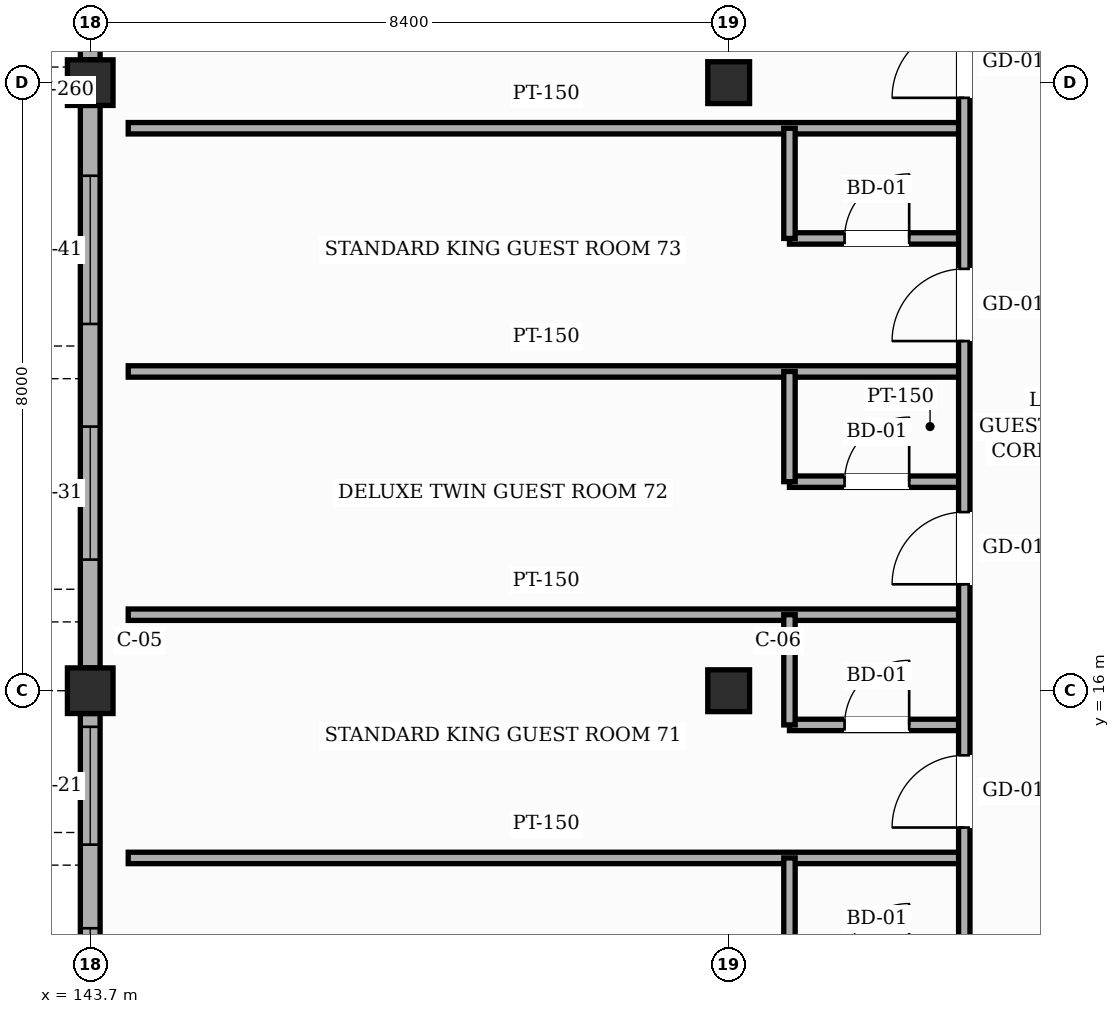
"""IFC4 building model, lengths in metres.
Left out: names, types, materials, properties, quantities, classifications, styles, units other than length and angle.
Written with IfcOpenShell. Run it as: python <this file> out.ifc"""

import sys

from ifc_helpers import new_model, si_unit, direction, frame, frame_2d, origin, origin_2d, place, context, subcontext, project, spatial, rectangle, hollow_rectangle, extrude, element, fill, save


model = new_model("IFC4")
c1 = context("Model", 3, precision=1e-05, world=origin(), true_north=direction((0.0, 1.0)))
c2 = subcontext(c1, "Body", "Model", "MODEL_VIEW")
j1 = project(units=[si_unit("LENGTHUNIT", "METRE"), si_unit("PLANEANGLEUNIT", "RADIAN")], contexts=[c1])
p1 = place(None, origin())
s1 = spatial("IfcSite", under=j1, at=p1, CompositionType="ELEMENT")
p2 = place(p1, origin())
s2 = spatial("IfcBuilding", under=s1, at=p2, CompositionType="ELEMENT")
p3 = place(p2, frame((0.0, 0.0, 24.6)))
s3 = spatial("IfcBuildingStorey", under=s2, at=p3, CompositionType="ELEMENT", Elevation=24.6)
for number, where, z_axis, x_axis in (
    (1, (143.7, 16.0, 0.0), (0.0, 0.0, 1.0), (1.0, 0.0, 0.0)),
    (2, (143.7, 24.0, 0.0), (0.0, 0.0, 1.0), (1.0, 0.0, 0.0)),
):
    element("IfcColumn", number, at=place(p3, frame(where, z_axis=z_axis, x_axis=x_axis)), inside=s3, PredefinedType="COLUMN", context=c2, shape_type="SweptSolid", body=[
        extrude(hollow_rectangle(XDim=0.6, YDim=0.6, WallThickness=0.025, InnerFilletRadius=0.025, OuterFilletRadius=0.05, at=origin_2d()), origin(), (0.0, 0.0, 1.0), 3.6),
    ])
for number, where, z_axis, x_axis in (
    (3, (152.1, 16.0, 0.0), (0.0, 0.0, 1.0), (1.0, 0.0, 0.0)),
    (4, (152.1, 24.0, 0.0), (0.0, 0.0, 1.0), (1.0, 0.0, 0.0)),
):
    element("IfcColumn", number, at=place(p3, frame(where, z_axis=z_axis, x_axis=x_axis)), inside=s3, PredefinedType="COLUMN", context=c2, shape_type="SweptSolid", body=[
        extrude(hollow_rectangle(XDim=0.55, YDim=0.55, WallThickness=0.022, InnerFilletRadius=0.022, OuterFilletRadius=0.044, at=origin_2d()), origin(), (0.0, 0.0, 1.0), 3.6),
    ])
p4 = place(p3, frame((143.7, 8.3, 0.0), z_axis=(0.0, 0.0, 1.0), x_axis=(0.0, 1.0, 0.0)))
e5 = element("IfcWall", 5, at=p4, inside=s3, PredefinedType="SOLIDWALL", context=c2, shape_type="SweptSolid", body=[
    extrude(rectangle(XDim=7.4, YDim=0.26, at=frame_2d((3.7, 0.0))), origin(), (0.0, 0.0, 1.0), 2.805),
])
p5 = place(p4, frame((0.725, 0.0, 0.85)))
e6 = element("IfcOpeningElement", 6, at=p5, cuts=e5, PredefinedType="OPENING", context=c2, shape_type="SweptSolid", body=[
    extrude(rectangle(XDim=0.85, YDim=1.35, at=frame_2d((0.425, 0.675))), frame((0.0, 0.14, 0.0), z_axis=(0.0, -1.0, 0.0), x_axis=(1.0, 0.0, 0.0)), (0.0, 0.0, 1.0), 0.28),
])
p6 = place(p4, frame((3.225, 0.0, 0.85)))
e7 = element("IfcOpeningElement", 7, at=p6, cuts=e5, PredefinedType="OPENING", context=c2, shape_type="SweptSolid", body=[
    extrude(rectangle(XDim=1.35, YDim=1.35, at=frame_2d((0.675, 0.675))), frame((0.0, 0.14, 0.0), z_axis=(0.0, -1.0, 0.0), x_axis=(1.0, 0.0, 0.0)), (0.0, 0.0, 1.0), 0.28),
])
p7 = place(p4, frame((5.675, 0.0, 0.85)))
e8 = element("IfcOpeningElement", 8, at=p7, cuts=e5, PredefinedType="OPENING", context=c2, shape_type="SweptSolid", body=[
    extrude(rectangle(XDim=1.55, YDim=1.35, at=frame_2d((0.775, 0.675))), frame((0.0, 0.14, 0.0), z_axis=(0.0, -1.0, 0.0), x_axis=(1.0, 0.0, 0.0)), (0.0, 0.0, 1.0), 0.28),
])
p8 = place(p3, frame((143.7, 16.3, 0.0), z_axis=(0.0, 0.0, 1.0), x_axis=(0.0, 1.0, 0.0)))
e9 = element("IfcWall", 9, at=p8, inside=s3, PredefinedType="SOLIDWALL", context=c2, shape_type="SweptSolid", body=[
    extrude(rectangle(XDim=7.4, YDim=0.26, at=frame_2d((3.7, 0.0))), origin(), (0.0, 0.0, 1.0), 2.805),
])
p9 = place(p8, frame((1.425, 0.0, 0.85)))
e10 = element("IfcOpeningElement", 10, at=p9, cuts=e9, PredefinedType="OPENING", context=c2, shape_type="SweptSolid", body=[
    extrude(rectangle(XDim=1.75, YDim=1.35, at=frame_2d((0.875, 0.675))), frame((0.0, 0.14, 0.0), z_axis=(0.0, -1.0, 0.0), x_axis=(1.0, 0.0, 0.0)), (0.0, 0.0, 1.0), 0.28),
])
p10 = place(p8, frame((4.525, 0.0, 0.85)))
e11 = element("IfcOpeningElement", 11, at=p10, cuts=e9, PredefinedType="OPENING", context=c2, shape_type="SweptSolid", body=[
    extrude(rectangle(XDim=1.95, YDim=1.35, at=frame_2d((0.975, 0.675))), frame((0.0, 0.14, 0.0), z_axis=(0.0, -1.0, 0.0), x_axis=(1.0, 0.0, 0.0)), (0.0, 0.0, 1.0), 0.28),
])
p11 = place(p3, frame((143.7, 24.3, 0.0), z_axis=(0.0, 0.0, 1.0), x_axis=(0.0, 1.0, 0.0)))
e12 = element("IfcWall", 12, at=p11, inside=s3, PredefinedType="SOLIDWALL", context=c2, shape_type="SweptSolid", body=[
    extrude(rectangle(XDim=2.3, YDim=0.26, at=frame_2d((1.15, 0.0))), origin(), (0.0, 0.0, 1.0), 2.805),
])
p12 = place(p11, frame((0.725, 0.0, 0.85)))
e13 = element("IfcOpeningElement", 13, at=p12, cuts=e12, PredefinedType="OPENING", context=c2, shape_type="SweptSolid", body=[
    extrude(rectangle(XDim=0.85, YDim=1.35, at=frame_2d((0.425, 0.675))), frame((0.0, 0.14, 0.0), z_axis=(0.0, -1.0, 0.0), x_axis=(1.0, 0.0, 0.0)), (0.0, 0.0, 1.0), 0.28),
])
p13 = place(p3, frame((144.2, 13.8, 0.0), z_axis=(0.0, 0.0, 1.0), x_axis=(1.0, 0.0, 0.0)))
e14 = element("IfcWall", 14, at=p13, inside=s3, PredefinedType="PARTITIONING", context=c2, shape_type="SweptSolid", body=[
    extrude(rectangle(XDim=11.0, YDim=0.15, at=frame_2d((5.5, 0.0))), origin(), (0.0, 0.0, 1.0), 3.365),
])
p14 = place(p3, frame((152.9, 15.55, 0.0), z_axis=(0.0, 0.0, 1.0), x_axis=(1.0, 0.0, 0.0)))
e15 = element("IfcWall", 15, at=p14, inside=s3, PredefinedType="PARTITIONING", context=c2, shape_type="SweptSolid", body=[
    extrude(rectangle(XDim=2.3, YDim=0.15, at=frame_2d((1.15, 0.0))), origin(), (0.0, 0.0, 1.0), 3.365),
])
p15 = place(p14, frame((0.725, 0.0, 0.0)))
e16 = element("IfcOpeningElement", 16, at=p15, cuts=e15, PredefinedType="OPENING", context=c2, shape_type="SweptSolid", body=[
    extrude(rectangle(XDim=0.85, YDim=2.1, at=frame_2d((0.425, 1.05))), frame((0.0, 0.085, 0.0), z_axis=(0.0, -1.0, 0.0), x_axis=(1.0, 0.0, 0.0)), (0.0, 0.0, 1.0), 0.17),
])
p16 = place(p3, frame((144.2, 17.0, 0.0), z_axis=(0.0, 0.0, 1.0), x_axis=(1.0, 0.0, 0.0)))
e17 = element("IfcWall", 17, at=p16, inside=s3, PredefinedType="PARTITIONING", context=c2, shape_type="SweptSolid", body=[
    extrude(rectangle(XDim=11.0, YDim=0.15, at=frame_2d((5.5, 0.0))), origin(), (0.0, 0.0, 1.0), 3.365),
])
p17 = place(p3, frame((152.9, 18.75, 0.0), z_axis=(0.0, 0.0, 1.0), x_axis=(1.0, 0.0, 0.0)))
e18 = element("IfcWall", 18, at=p17, inside=s3, PredefinedType="PARTITIONING", context=c2, shape_type="SweptSolid", body=[
    extrude(rectangle(XDim=2.3, YDim=0.15, at=frame_2d((1.15, 0.0))), origin(), (0.0, 0.0, 1.0), 3.365),
])
p18 = place(p17, frame((0.725, 0.0, 0.0)))
e19 = element("IfcOpeningElement", 19, at=p18, cuts=e18, PredefinedType="OPENING", context=c2, shape_type="SweptSolid", body=[
    extrude(rectangle(XDim=0.85, YDim=2.1, at=frame_2d((0.425, 1.05))), frame((0.0, 0.085, 0.0), z_axis=(0.0, -1.0, 0.0), x_axis=(1.0, 0.0, 0.0)), (0.0, 0.0, 1.0), 0.17),
])
p19 = place(p3, frame((144.2, 20.2, 0.0), z_axis=(0.0, 0.0, 1.0), x_axis=(1.0, 0.0, 0.0)))
e20 = element("IfcWall", 20, at=p19, inside=s3, PredefinedType="PARTITIONING", context=c2, shape_type="SweptSolid", body=[
    extrude(rectangle(XDim=11.0, YDim=0.15, at=frame_2d((5.5, 0.0))), origin(), (0.0, 0.0, 1.0), 3.005),
])
p20 = place(p3, frame((152.9, 21.95, 0.0), z_axis=(0.0, 0.0, 1.0), x_axis=(1.0, 0.0, 0.0)))
e21 = element("IfcWall", 21, at=p20, inside=s3, PredefinedType="PARTITIONING", context=c2, shape_type="SweptSolid", body=[
    extrude(rectangle(XDim=2.3, YDim=0.15, at=frame_2d((1.15, 0.0))), origin(), (0.0, 0.0, 1.0), 3.365),
])
p21 = place(p20, frame((0.725, 0.0, 0.0)))
e22 = element("IfcOpeningElement", 22, at=p21, cuts=e21, PredefinedType="OPENING", context=c2, shape_type="SweptSolid", body=[
    extrude(rectangle(XDim=0.85, YDim=2.1, at=frame_2d((0.425, 1.05))), frame((0.0, 0.085, 0.0), z_axis=(0.0, -1.0, 0.0), x_axis=(1.0, 0.0, 0.0)), (0.0, 0.0, 1.0), 0.17),
])
p22 = place(p3, frame((144.2, 23.4, 0.0), z_axis=(0.0, 0.0, 1.0), x_axis=(1.0, 0.0, 0.0)))
e23 = element("IfcWall", 23, at=p22, inside=s3, PredefinedType="PARTITIONING", context=c2, shape_type="SweptSolid", body=[
    extrude(rectangle(XDim=11.0, YDim=0.15, at=frame_2d((5.5, 0.0))), origin(), (0.0, 0.0, 1.0), 3.365),
])
for number, where, z_axis, x_axis in (
    (24, (152.9, 12.35, 0.0), (0.0, 0.0, 1.0), (0.0, 1.0, 0.0)),
    (25, (152.9, 15.55, 0.0), (0.0, 0.0, 1.0), (0.0, 1.0, 0.0)),
    (26, (152.9, 18.75, 0.0), (0.0, 0.0, 1.0), (0.0, 1.0, 0.0)),
    (27, (152.9, 21.95, 0.0), (0.0, 0.0, 1.0), (0.0, 1.0, 0.0)),
):
    element("IfcWall", number, at=place(p3, frame(where, z_axis=z_axis, x_axis=x_axis)), inside=s3, PredefinedType="PARTITIONING", context=c2, shape_type="SweptSolid", body=[
        extrude(rectangle(XDim=1.45, YDim=0.15, at=frame_2d((0.725, 0.0))), origin(), (0.0, 0.0, 1.0), 3.365),
    ])
p23 = place(p3, frame((155.2, 1.0, 0.0), z_axis=(0.0, 0.0, 1.0), x_axis=(0.0, 1.0, 0.0)))
e28 = element("IfcWall", 28, at=p23, inside=s3, PredefinedType="PARTITIONING", context=c2, shape_type="SweptSolid", body=[
    extrude(rectangle(XDim=25.6, YDim=0.15, at=frame_2d((12.8, 0.0))), origin(), (0.0, 0.0, 1.0), 3.365),
])
p24 = place(p23, frame((0.325, 0.0, 0.0)))
e29 = element("IfcOpeningElement", 29, at=p24, cuts=e28, PredefinedType="OPENING", context=c2, shape_type="SweptSolid", body=[
    extrude(rectangle(XDim=1.1, YDim=2.2, at=frame_2d((0.55, 1.1))), frame((0.0, 0.085, 0.0), z_axis=(0.0, -1.0, 0.0), x_axis=(1.0, 0.0, 0.0)), (0.0, 0.0, 1.0), 0.17),
])
p25 = place(p23, frame((3.6, 0.0, 0.0)))
e30 = element("IfcOpeningElement", 30, at=p25, cuts=e28, PredefinedType="OPENING", context=c2, shape_type="SweptSolid", body=[
    extrude(rectangle(XDim=0.95, YDim=2.15, at=frame_2d((0.475, 1.075))), frame((0.0, 0.085, 0.0), z_axis=(0.0, -1.0, 0.0), x_axis=(1.0, 0.0, 0.0)), (0.0, 0.0, 1.0), 0.17),
])
p26 = place(p23, frame((6.8, 0.0, 0.0)))
e31 = element("IfcOpeningElement", 31, at=p26, cuts=e28, PredefinedType="OPENING", context=c2, shape_type="SweptSolid", body=[
    extrude(rectangle(XDim=0.95, YDim=2.15, at=frame_2d((0.475, 1.075))), frame((0.0, 0.085, 0.0), z_axis=(0.0, -1.0, 0.0), x_axis=(1.0, 0.0, 0.0)), (0.0, 0.0, 1.0), 0.17),
])
p27 = place(p23, frame((10.0, 0.0, 0.0)))
e32 = element("IfcOpeningElement", 32, at=p27, cuts=e28, PredefinedType="OPENING", context=c2, shape_type="SweptSolid", body=[
    extrude(rectangle(XDim=0.95, YDim=2.15, at=frame_2d((0.475, 1.075))), frame((0.0, 0.085, 0.0), z_axis=(0.0, -1.0, 0.0), x_axis=(1.0, 0.0, 0.0)), (0.0, 0.0, 1.0), 0.17),
])
p28 = place(p23, frame((13.2, 0.0, 0.0)))
e33 = element("IfcOpeningElement", 33, at=p28, cuts=e28, PredefinedType="OPENING", context=c2, shape_type="SweptSolid", body=[
    extrude(rectangle(XDim=0.95, YDim=2.15, at=frame_2d((0.475, 1.075))), frame((0.0, 0.085, 0.0), z_axis=(0.0, -1.0, 0.0), x_axis=(1.0, 0.0, 0.0)), (0.0, 0.0, 1.0), 0.17),
])
p29 = place(p23, frame((16.4, 0.0, 0.0)))
e34 = element("IfcOpeningElement", 34, at=p29, cuts=e28, PredefinedType="OPENING", context=c2, shape_type="SweptSolid", body=[
    extrude(rectangle(XDim=0.95, YDim=2.15, at=frame_2d((0.475, 1.075))), frame((0.0, 0.085, 0.0), z_axis=(0.0, -1.0, 0.0), x_axis=(1.0, 0.0, 0.0)), (0.0, 0.0, 1.0), 0.17),
])
p30 = place(p23, frame((19.6, 0.0, 0.0)))
e35 = element("IfcOpeningElement", 35, at=p30, cuts=e28, PredefinedType="OPENING", context=c2, shape_type="SweptSolid", body=[
    extrude(rectangle(XDim=0.95, YDim=2.15, at=frame_2d((0.475, 1.075))), frame((0.0, 0.085, 0.0), z_axis=(0.0, -1.0, 0.0), x_axis=(1.0, 0.0, 0.0)), (0.0, 0.0, 1.0), 0.17),
])
p31 = place(p23, frame((22.8, 0.0, 0.0)))
e36 = element("IfcOpeningElement", 36, at=p31, cuts=e28, PredefinedType="OPENING", context=c2, shape_type="SweptSolid", body=[
    extrude(rectangle(XDim=0.95, YDim=2.15, at=frame_2d((0.475, 1.075))), frame((0.0, 0.085, 0.0), z_axis=(0.0, -1.0, 0.0), x_axis=(1.0, 0.0, 0.0)), (0.0, 0.0, 1.0), 0.17),
])
p32 = place(p6, origin())
e37 = element("IfcWindow", 37, at=p32, inside=s3, PartitioningType="SINGLE_PANEL", PredefinedType="WINDOW", context=c2, shape_type="SweptSolid", body=[
    extrude(rectangle(XDim=1.35, YDim=1.35, at=frame_2d((0.675, 0.675))), frame((0.0, 0.03, 0.0), z_axis=(0.0, -1.0, 0.0), x_axis=(1.0, 0.0, 0.0)), (0.0, 0.0, 1.0), 0.06),
])
fill(e7, e37)
p33 = place(p7, origin())
e38 = element("IfcWindow", 38, at=p33, inside=s3, PartitioningType="SINGLE_PANEL", PredefinedType="WINDOW", context=c2, shape_type="SweptSolid", body=[
    extrude(rectangle(XDim=1.55, YDim=1.35, at=frame_2d((0.775, 0.675))), frame((0.0, 0.03, 0.0), z_axis=(0.0, -1.0, 0.0), x_axis=(1.0, 0.0, 0.0)), (0.0, 0.0, 1.0), 0.06),
])
fill(e8, e38)
p34 = place(p9, origin())
e39 = element("IfcWindow", 39, at=p34, inside=s3, PartitioningType="SINGLE_PANEL", PredefinedType="WINDOW", context=c2, shape_type="SweptSolid", body=[
    extrude(rectangle(XDim=1.75, YDim=1.35, at=frame_2d((0.875, 0.675))), frame((0.0, 0.03, 0.0), z_axis=(0.0, -1.0, 0.0), x_axis=(1.0, 0.0, 0.0)), (0.0, 0.0, 1.0), 0.06),
])
fill(e10, e39)
p35 = place(p10, origin())
e40 = element("IfcWindow", 40, at=p35, inside=s3, PartitioningType="SINGLE_PANEL", PredefinedType="WINDOW", context=c2, shape_type="SweptSolid", body=[
    extrude(rectangle(XDim=1.95, YDim=1.35, at=frame_2d((0.975, 0.675))), frame((0.0, 0.03, 0.0), z_axis=(0.0, -1.0, 0.0), x_axis=(1.0, 0.0, 0.0)), (0.0, 0.0, 1.0), 0.06),
])
fill(e11, e40)
p36 = place(p28, origin())
e41 = element("IfcDoor", 41, at=p36, inside=s3, OperationType="SINGLE_SWING_LEFT", PredefinedType="DOOR", context=c2, shape_type="SweptSolid", body=[
    extrude(rectangle(XDim=0.95, YDim=2.15, at=frame_2d((0.475, 1.075))), frame((0.0, 0.025, 0.0), z_axis=(0.0, -1.0, 0.0), x_axis=(1.0, 0.0, 0.0)), (0.0, 0.0, 1.0), 0.05),
])
fill(e33, e41)
p37 = place(p15, origin())
e42 = element("IfcDoor", 42, at=p37, inside=s3, OperationType="SINGLE_SWING_RIGHT", PredefinedType="DOOR", context=c2, shape_type="SweptSolid", body=[
    extrude(rectangle(XDim=0.85, YDim=2.1, at=frame_2d((0.425, 1.05))), frame((0.0, 0.025, 0.0), z_axis=(0.0, -1.0, 0.0), x_axis=(1.0, 0.0, 0.0)), (0.0, 0.0, 1.0), 0.05),
])
fill(e16, e42)
p38 = place(p29, origin())
e43 = element("IfcDoor", 43, at=p38, inside=s3, OperationType="SINGLE_SWING_LEFT", PredefinedType="DOOR", context=c2, shape_type="SweptSolid", body=[
    extrude(rectangle(XDim=0.95, YDim=2.15, at=frame_2d((0.475, 1.075))), frame((0.0, 0.025, 0.0), z_axis=(0.0, -1.0, 0.0), x_axis=(1.0, 0.0, 0.0)), (0.0, 0.0, 1.0), 0.05),
])
fill(e34, e43)
p39 = place(p18, origin())
e44 = element("IfcDoor", 44, at=p39, inside=s3, OperationType="SINGLE_SWING_RIGHT", PredefinedType="DOOR", context=c2, shape_type="SweptSolid", body=[
    extrude(rectangle(XDim=0.85, YDim=2.1, at=frame_2d((0.425, 1.05))), frame((0.0, 0.025, 0.0), z_axis=(0.0, -1.0, 0.0), x_axis=(1.0, 0.0, 0.0)), (0.0, 0.0, 1.0), 0.05),
])
fill(e19, e44)
p40 = place(p30, origin())
e45 = element("IfcDoor", 45, at=p40, inside=s3, OperationType="SINGLE_SWING_LEFT", PredefinedType="DOOR", context=c2, shape_type="SweptSolid", body=[
    extrude(rectangle(XDim=0.95, YDim=2.15, at=frame_2d((0.475, 1.075))), frame((0.0, 0.025, 0.0), z_axis=(0.0, -1.0, 0.0), x_axis=(1.0, 0.0, 0.0)), (0.0, 0.0, 1.0), 0.05),
])
fill(e35, e45)
p41 = place(p21, origin())
e46 = element("IfcDoor", 46, at=p41, inside=s3, OperationType="SINGLE_SWING_RIGHT", PredefinedType="DOOR", context=c2, shape_type="SweptSolid", body=[
    extrude(rectangle(XDim=0.85, YDim=2.1, at=frame_2d((0.425, 1.05))), frame((0.0, 0.025, 0.0), z_axis=(0.0, -1.0, 0.0), x_axis=(1.0, 0.0, 0.0)), (0.0, 0.0, 1.0), 0.05),
])
fill(e22, e46)
p42 = place(p31, origin())
e47 = element("IfcDoor", 47, at=p42, inside=s3, OperationType="SINGLE_SWING_LEFT", PredefinedType="DOOR", context=c2, shape_type="SweptSolid", body=[
    extrude(rectangle(XDim=0.95, YDim=2.15, at=frame_2d((0.475, 1.075))), frame((0.0, 0.025, 0.0), z_axis=(0.0, -1.0, 0.0), x_axis=(1.0, 0.0, 0.0)), (0.0, 0.0, 1.0), 0.05),
])
fill(e36, e47)
save(model, sys.argv[1])
